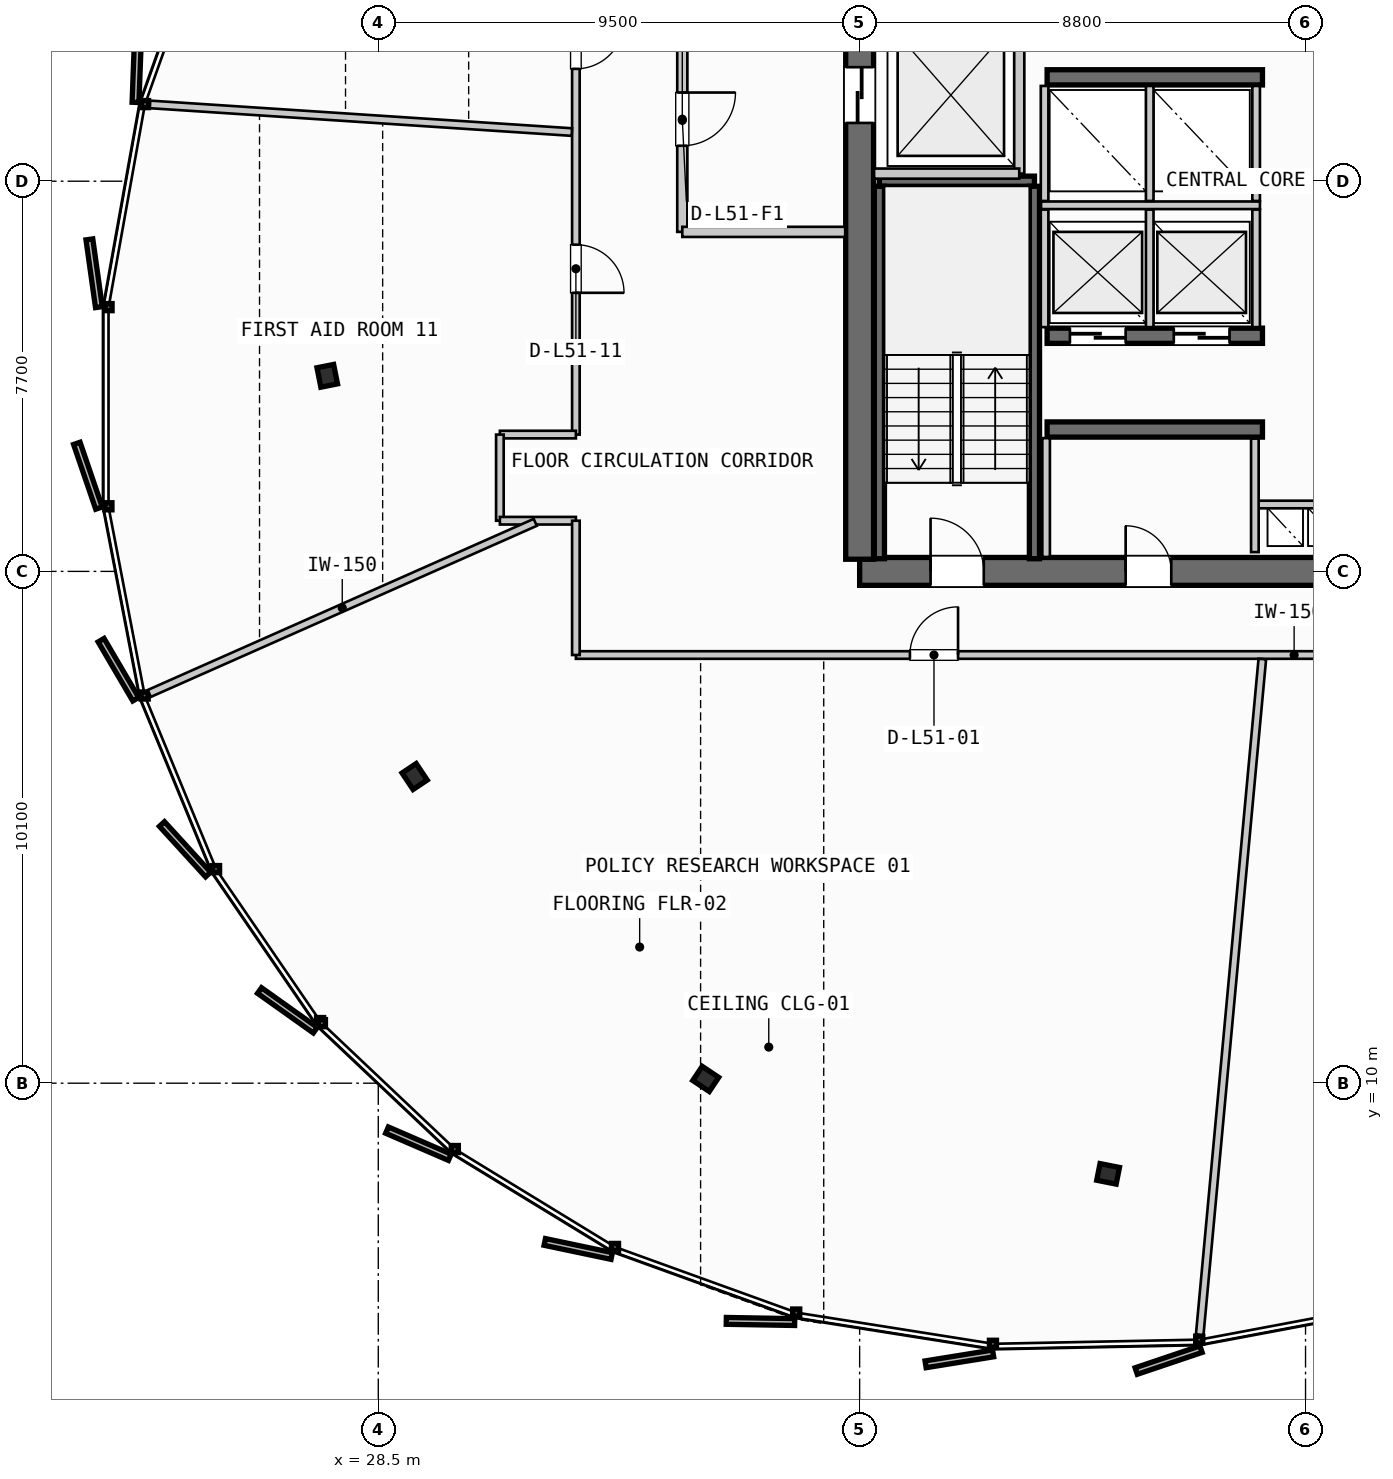
"""IFC4 building model, lengths in metres.
Left out: names, types, materials, properties, quantities, classifications, styles, units other than length and angle.
Written with IfcOpenShell. Run it as: python <this file> out.ifc"""

import sys

from ifc_helpers import new_model, si_unit, direction, frame, frame_2d, origin, origin_2d, place, context, subcontext, project, spatial, rectangle, i_section, extrude, source, transform, mapped, element, fill, save


model = new_model("IFC4")
c1 = context("Model", 3, precision=1e-05, world=origin(), true_north=direction((0.0, 1.0)))
c2 = subcontext(c1, "Body", "Model", "MODEL_VIEW")
j1 = project(units=[si_unit("LENGTHUNIT", "METRE"), si_unit("PLANEANGLEUNIT", "RADIAN")], contexts=[c1])
p1 = place(None, origin())
s1 = spatial("IfcSite", under=j1, at=p1, CompositionType="ELEMENT")
p2 = place(p1, origin())
s2 = spatial("IfcBuilding", under=s1, at=p2, CompositionType="ELEMENT")
p3 = place(p2, frame((0.0, 0.0, 197.4)))
s3 = spatial("IfcBuildingStorey", under=s2, at=p3, CompositionType="ELEMENT", Elevation=197.4)
p4 = place(p3, frame((38.0, 20.1, 0.0), z_axis=(0.0, 0.0, 1.0), x_axis=(1.0, 0.0, 0.0)))
e1 = element("IfcWall", 1, at=p4, inside=s3, PredefinedType="SHEAR", context=c2, shape_type="SweptSolid", body=[
    extrude(rectangle(XDim=17.6, YDim=0.55, at=frame_2d((8.8, 0.0))), origin(), (0.0, 0.0, 1.0), 3.26),
])
p5 = place(p4, frame((1.4, 0.0, 0.0)))
e2 = element("IfcOpeningElement", 2, at=p5, cuts=e1, PredefinedType="OPENING", context=c2, shape_type="SweptSolid", body=[
    extrude(rectangle(XDim=1.05, YDim=2.15, at=frame_2d((0.525, 1.075))), frame((0.0, 0.285, 0.0), z_axis=(0.0, -1.0, 0.0), x_axis=(1.0, 0.0, 0.0)), (0.0, 0.0, 1.0), 0.57),
])
p6 = place(p4, frame((15.15, 0.0, 0.0)))
e3 = element("IfcOpeningElement", 3, at=p6, cuts=e1, PredefinedType="OPENING", context=c2, shape_type="SweptSolid", body=[
    extrude(rectangle(XDim=1.05, YDim=2.15, at=frame_2d((0.525, 1.075))), frame((0.0, 0.285, 0.0), z_axis=(0.0, -1.0, 0.0), x_axis=(1.0, 0.0, 0.0)), (0.0, 0.0, 1.0), 0.57),
])
p7 = place(p4, frame((5.25, 0.0, 0.0)))
e4 = element("IfcOpeningElement", 4, at=p7, cuts=e1, PredefinedType="OPENING", context=c2, shape_type="SweptSolid", body=[
    extrude(rectangle(XDim=0.9, YDim=2.15, at=frame_2d((0.45, 1.075))), frame((0.0, 0.285, 0.0), z_axis=(0.0, -1.0, 0.0), x_axis=(1.0, 0.0, 0.0)), (0.0, 0.0, 1.0), 0.57),
])
p8 = place(p4, frame((11.4, 0.0, 0.0)))
e5 = element("IfcOpeningElement", 5, at=p8, cuts=e1, PredefinedType="OPENING", context=c2, shape_type="SweptSolid", body=[
    extrude(rectangle(XDim=0.95, YDim=2.15, at=frame_2d((0.475, 1.075))), frame((0.0, 0.285, 0.0), z_axis=(0.0, -1.0, 0.0), x_axis=(1.0, 0.0, 0.0)), (0.0, 0.0, 1.0), 0.57),
])
p9 = place(p3, frame((38.0, 35.26, 0.0), z_axis=(0.0, 0.0, 1.0), x_axis=(0.0, -1.0, 0.0)))
e6 = element("IfcWall", 6, at=p9, inside=s3, PredefinedType="SHEAR", context=c2, shape_type="SweptSolid", body=[
    extrude(rectangle(XDim=14.92, YDim=0.55, at=frame_2d((7.46, 0.0))), origin(), (0.0, 0.0, 1.0), 3.26),
])
p10 = place(p9, frame((5.21, 0.0, 0.0)))
e7 = element("IfcOpeningElement", 7, at=p10, cuts=e6, PredefinedType="OPENING", context=c2, shape_type="SweptSolid", body=[
    extrude(rectangle(XDim=1.1, YDim=2.2, at=frame_2d((0.55, 1.1))), frame((0.0, 0.285, 0.0), z_axis=(0.0, -1.0, 0.0), x_axis=(1.0, 0.0, 0.0)), (0.0, 0.0, 1.0), 0.57),
])
p11 = place(p3, frame((41.7, 22.9, 0.0), z_axis=(0.0, 0.0, 1.0), x_axis=(1.0, 0.0, 0.0)))
e8 = element("IfcWall", 8, at=p11, inside=s3, PredefinedType="SHEAR", context=c2, shape_type="SweptSolid", body=[
    extrude(rectangle(XDim=4.25, YDim=0.3, at=frame_2d((2.125, 0.0))), origin(), (0.0, 0.0, 1.0), 3.26),
])
p12 = place(p3, frame((41.7, 24.75, 0.0), z_axis=(0.0, 0.0, 1.0), x_axis=(1.0, 0.0, 0.0)))
e9 = element("IfcWall", 9, at=p12, inside=s3, PredefinedType="SHEAR", context=c2, shape_type="SweptSolid", body=[
    extrude(rectangle(XDim=4.25, YDim=0.3, at=frame_2d((2.125, 0.0))), origin(), (0.0, 0.0, 1.0), 3.26),
])
p13 = place(p12, frame((0.45, 0.0, 0.0)))
e10 = element("IfcOpeningElement", 10, at=p13, cuts=e9, PredefinedType="OPENING", context=c2, shape_type="SweptSolid", body=[
    extrude(rectangle(XDim=1.1, YDim=2.2, at=frame_2d((0.55, 1.1))), frame((0.0, 0.16, 0.0), z_axis=(0.0, -1.0, 0.0), x_axis=(1.0, 0.0, 0.0)), (0.0, 0.0, 1.0), 0.32),
])
p14 = place(p12, frame((2.5, 0.0, 0.0)))
e11 = element("IfcOpeningElement", 11, at=p14, cuts=e9, PredefinedType="OPENING", context=c2, shape_type="SweptSolid", body=[
    extrude(rectangle(XDim=1.1, YDim=2.2, at=frame_2d((0.55, 1.1))), frame((0.0, 0.16, 0.0), z_axis=(0.0, -1.0, 0.0), x_axis=(1.0, 0.0, 0.0)), (0.0, 0.0, 1.0), 0.32),
])
p15 = place(p3, frame((41.7, 29.85, 0.0), z_axis=(0.0, 0.0, 1.0), x_axis=(1.0, 0.0, 0.0)))
e12 = element("IfcWall", 12, at=p15, inside=s3, PredefinedType="SHEAR", context=c2, shape_type="SweptSolid", body=[
    extrude(rectangle(XDim=4.25, YDim=0.3, at=frame_2d((2.125, 0.0))), origin(), (0.0, 0.0, 1.0), 3.26),
])
m1 = source(origin(), c2, "Body", "SweptSolid", [
    extrude(i_section(OverallWidth=0.391, OverallDepth=0.335, WebThickness=0.023, FlangeThickness=0.034, FilletRadius=0.015, at=origin_2d()), origin(), (0.0, 0.0, 1.0), 3.26),
])
for number, where, z_axis, x_axis in (
    (13, (27.493, 23.96, 0.0), (0.0, 0.0, 1.0), (-0.981, -0.195, 0.0)),
    (14, (29.218, 16.052, 0.0), (0.0, 0.0, 1.0), (-0.831, -0.556, 0.0)),
    (15, (34.963, 10.084, 0.0), (0.0, 0.0, 1.0), (-0.556, -0.831, 0.0)),
    (16, (42.904, 8.211, 0.0), (0.0, 0.0, 1.0), (-0.195, -0.981, 0.0)),
):
    element("IfcColumn", number, at=place(p3, frame(where, z_axis=z_axis, x_axis=x_axis)), inside=s3, PredefinedType="COLUMN", context=c2, shape_type="MappedRepresentation", body=[
        mapped(m1, transform((0.0, 0.0, 0.0), scale=1.0)),
    ])
p16 = place(p3, frame((38.39, 27.8, 0.0), z_axis=(0.0, 0.0, 1.0), x_axis=(1.0, 0.0, 0.0)))
e17 = element("IfcWall", 17, at=p16, inside=s3, PredefinedType="SHEAR", context=c2, shape_type="SweptSolid", body=[
    extrude(rectangle(XDim=3.06, YDim=0.2, at=frame_2d((1.53, 0.0))), origin(), (0.0, 0.0, 1.0), 3.26),
])
for number, where, z_axis, x_axis in (
    (18, (41.45, 27.7, 0.0), (0.0, 0.0, 1.0), (0.0, -1.0, 0.0)),
    (19, (38.39, 20.35, 0.0), (0.0, 0.0, 1.0), (0.0, 1.0, 0.0)),
):
    element("IfcWall", number, at=place(p3, frame(where, z_axis=z_axis, x_axis=x_axis)), inside=s3, PredefinedType="SHEAR", context=c2, shape_type="SweptSolid", body=[
        extrude(rectangle(XDim=7.35, YDim=0.2, at=frame_2d((3.675, 0.0))), origin(), (0.0, 0.0, 1.0), 3.26),
    ])
p17 = place(p3, frame((45.8, 21.42, 0.0), z_axis=(0.0, 0.0, 1.0), x_axis=(1.0, 0.0, 0.0)))
e20 = element("IfcWall", 20, at=p17, inside=s3, PredefinedType="PARTITIONING", context=c2, shape_type="SweptSolid", body=[
    extrude(rectangle(XDim=2.0, YDim=0.15, at=frame_2d((1.0, 0.0))), origin(), (0.0, 0.0, 1.0), 2.595),
])
p18 = place(p3, frame((45.8, 20.48, 0.0), z_axis=(0.0, 0.0, 1.0), x_axis=(0.0, 1.0, 0.0)))
e21 = element("IfcWall", 21, at=p18, inside=s3, PredefinedType="PARTITIONING", context=c2, shape_type="SweptSolid", body=[
    extrude(rectangle(XDim=2.24, YDim=0.15, at=frame_2d((1.12, 0.0))), origin(), (0.0, 0.0, 1.0), 2.595),
])
p19 = place(p3, frame((41.15, 27.95, 0.0), z_axis=(0.0, 0.0, 1.0), x_axis=(0.0, 1.0, 0.0)))
e22 = element("IfcWall", 22, at=p19, inside=s3, PredefinedType="PARTITIONING", context=c2, shape_type="SweptSolid", body=[
    extrude(rectangle(XDim=3.1, YDim=0.2, at=frame_2d((1.55, 0.0))), origin(), (0.0, 0.0, 1.0), 2.595),
])
p20 = place(p3, frame((38.285, 27.95, 0.0), z_axis=(0.0, 0.0, 1.0), x_axis=(1.0, 0.0, 0.0)))
e23 = element("IfcWall", 23, at=p20, inside=s3, PredefinedType="PARTITIONING", context=c2, shape_type="SweptSolid", body=[
    extrude(rectangle(XDim=2.865, YDim=0.2, at=frame_2d((1.433, 0.0))), origin(), (0.0, 0.0, 1.0), 2.595),
])
p21 = place(p3, frame((34.5, 31.2, 0.0), z_axis=(0.0, 0.0, 1.0), x_axis=(0.0, -1.0, 0.0)))
e24 = element("IfcWall", 24, at=p21, inside=s3, PredefinedType="PARTITIONING", context=c2, shape_type="SweptSolid", body=[
    extrude(rectangle(XDim=4.4, YDim=0.2, at=frame_2d((2.2, 0.0))), origin(), (0.0, 0.0, 1.0), 2.595),
])
p22 = place(p21, frame((1.65, 0.0, 0.0)))
e25 = element("IfcOpeningElement", 25, at=p22, cuts=e24, PredefinedType="OPENING", context=c2, shape_type="SweptSolid", body=[
    extrude(rectangle(XDim=1.05, YDim=2.15, at=frame_2d((0.525, 1.075))), frame((0.0, 0.11, 0.0), z_axis=(0.0, -1.0, 0.0), x_axis=(1.0, 0.0, 0.0)), (0.0, 0.0, 1.0), 0.22),
])
p23 = place(p3, frame((34.5, 26.8, 0.0), z_axis=(0.0, 0.0, 1.0), x_axis=(1.0, 0.0, 0.0)))
e26 = element("IfcWall", 26, at=p23, inside=s3, PredefinedType="PARTITIONING", context=c2, shape_type="SweptSolid", body=[
    extrude(rectangle(XDim=3.215, YDim=0.2, at=frame_2d((1.607, 0.0))), origin(), (0.0, 0.0, 1.0), 2.595),
])
p24 = place(p3, frame((41.68, 20.385, 0.0), z_axis=(0.0, 0.0, 1.0), x_axis=(0.0, 1.0, 0.0)))
e27 = element("IfcWall", 27, at=p24, inside=s3, PredefinedType="PARTITIONING", context=c2, shape_type="SweptSolid", body=[
    extrude(rectangle(XDim=2.345, YDim=0.15, at=frame_2d((1.172, 0.0))), origin(), (0.0, 0.0, 1.0), 2.595),
])
p25 = place(p3, frame((41.58, 27.325, 0.0), z_axis=(0.0, 0.0, 1.0), x_axis=(1.0, 0.0, 0.0)))
e28 = element("IfcWall", 28, at=p25, inside=s3, PredefinedType="PARTITIONING", context=c2, shape_type="SweptSolid", body=[
    extrude(rectangle(XDim=4.32, YDim=0.15, at=frame_2d((2.16, 0.0))), origin(), (0.0, 0.0, 1.0), 2.595),
])
for number, where, z_axis, x_axis in (
    (29, (41.65, 24.92, 0.0), (0.0, 0.0, 1.0), (0.0, 1.0, 0.0)),
    (30, (43.725, 24.92, 0.0), (0.0, 0.0, 1.0), (0.0, 1.0, 0.0)),
    (31, (45.825, 24.92, 0.0), (0.0, 0.0, 1.0), (0.0, 1.0, 0.0)),
):
    element("IfcWall", number, at=place(p3, frame(where, z_axis=z_axis, x_axis=x_axis)), inside=s3, PredefinedType="PARTITIONING", context=c2, shape_type="SweptSolid", body=[
        extrude(rectangle(XDim=2.32, YDim=0.15, at=frame_2d((1.16, 0.0))), origin(), (0.0, 0.0, 1.0), 2.595),
    ])
for number, where, z_axis, x_axis in (
    (32, (41.65, 27.41, 0.0), (0.0, 0.0, 1.0), (0.0, 1.0, 0.0)),
    (33, (43.725, 27.41, 0.0), (0.0, 0.0, 1.0), (0.0, 1.0, 0.0)),
    (34, (45.825, 27.41, 0.0), (0.0, 0.0, 1.0), (0.0, 1.0, 0.0)),
):
    element("IfcWall", number, at=place(p3, frame(where, z_axis=z_axis, x_axis=x_axis)), inside=s3, PredefinedType="PARTITIONING", context=c2, shape_type="SweptSolid", body=[
        extrude(rectangle(XDim=2.27, YDim=0.15, at=frame_2d((1.135, 0.0))), origin(), (0.0, 0.0, 1.0), 2.595),
    ])
p26 = place(p3, frame((32.4, 18.45, 0.0), z_axis=(0.0, 0.0, 1.0), x_axis=(1.0, 0.0, 0.0)))
e35 = element("IfcWall", 35, at=p26, inside=s3, PredefinedType="PARTITIONING", context=c2, shape_type="SweptSolid", body=[
    extrude(rectangle(XDim=28.35, YDim=0.15, at=frame_2d((14.175, 0.0))), origin(), (0.0, 0.0, 1.0), 2.595),
])
p27 = place(p26, frame((6.592, 0.0, 0.0)))
e36 = element("IfcOpeningElement", 36, at=p27, cuts=e35, PredefinedType="OPENING", context=c2, shape_type="SweptSolid", body=[
    extrude(rectangle(XDim=0.95, YDim=2.15, at=frame_2d((0.475, 1.075))), frame((0.0, 0.085, 0.0), z_axis=(0.0, -1.0, 0.0), x_axis=(1.0, 0.0, 0.0)), (0.0, 0.0, 1.0), 0.17),
])
p28 = place(p26, frame((19.725, 0.0, 0.0)))
e37 = element("IfcOpeningElement", 37, at=p28, cuts=e35, PredefinedType="OPENING", context=c2, shape_type="SweptSolid", body=[
    extrude(rectangle(XDim=0.95, YDim=2.15, at=frame_2d((0.475, 1.075))), frame((0.0, 0.085, 0.0), z_axis=(0.0, -1.0, 0.0), x_axis=(1.0, 0.0, 0.0)), (0.0, 0.0, 1.0), 0.17),
])
p29 = place(p3, frame((32.4, 32.8, 0.0), z_axis=(0.0, 0.0, 1.0), x_axis=(0.0, -1.0, 0.0)))
e38 = element("IfcWall", 38, at=p29, inside=s3, PredefinedType="PARTITIONING", context=c2, shape_type="SweptSolid", body=[
    extrude(rectangle(XDim=10.0, YDim=0.15, at=frame_2d((5.0, 0.0))), origin(), (0.0, 0.0, 1.0), 2.595),
])
p30 = place(p29, frame((1.833, 0.0, 0.0)))
e39 = element("IfcOpeningElement", 39, at=p30, cuts=e38, PredefinedType="OPENING", context=c2, shape_type="SweptSolid", body=[
    extrude(rectangle(XDim=0.95, YDim=2.15, at=frame_2d((0.475, 1.075))), frame((0.0, 0.085, 0.0), z_axis=(0.0, -1.0, 0.0), x_axis=(1.0, 0.0, 0.0)), (0.0, 0.0, 1.0), 0.17),
])
p31 = place(p29, frame((6.252, 0.0, 0.0)))
e40 = element("IfcOpeningElement", 40, at=p31, cuts=e38, PredefinedType="OPENING", context=c2, shape_type="SweptSolid", body=[
    extrude(rectangle(XDim=0.95, YDim=2.15, at=frame_2d((0.475, 1.075))), frame((0.0, 0.085, 0.0), z_axis=(0.0, -1.0, 0.0), x_axis=(1.0, 0.0, 0.0)), (0.0, 0.0, 1.0), 0.17),
])
p32 = place(p3, frame((32.4, 22.8, 0.0), z_axis=(0.0, 0.0, 1.0), x_axis=(-1.0, 0.0, 0.0)))
e41 = element("IfcWall", 41, at=p32, inside=s3, PredefinedType="PARTITIONING", context=c2, shape_type="SweptSolid", body=[
    extrude(rectangle(XDim=1.5, YDim=0.15, at=frame_2d((0.75, 0.0))), origin(), (0.0, 0.0, 1.0), 2.595),
])
p33 = place(p3, frame((30.9, 22.8, 0.0), z_axis=(0.0, 0.0, 1.0), x_axis=(0.0, -1.0, 0.0)))
e42 = element("IfcWall", 42, at=p33, inside=s3, PredefinedType="PARTITIONING", context=c2, shape_type="SweptSolid", body=[
    extrude(rectangle(XDim=1.7, YDim=0.15, at=frame_2d((0.85, 0.0))), origin(), (0.0, 0.0, 1.0), 2.595),
])
p34 = place(p3, frame((30.9, 21.1, 0.0), z_axis=(0.0, 0.0, 1.0), x_axis=(1.0, 0.0, 0.0)))
e43 = element("IfcWall", 43, at=p34, inside=s3, PredefinedType="PARTITIONING", context=c2, shape_type="SweptSolid", body=[
    extrude(rectangle(XDim=1.5, YDim=0.15, at=frame_2d((0.75, 0.0))), origin(), (0.0, 0.0, 1.0), 2.595),
])
p35 = place(p3, frame((32.4, 21.1, 0.0), z_axis=(0.0, 0.0, 1.0), x_axis=(0.0, -1.0, 0.0)))
e44 = element("IfcWall", 44, at=p35, inside=s3, PredefinedType="PARTITIONING", context=c2, shape_type="SweptSolid", body=[
    extrude(rectangle(XDim=2.65, YDim=0.15, at=frame_2d((1.325, 0.0))), origin(), (0.0, 0.0, 1.0), 2.595),
])
p36 = place(p3, frame((31.598, 21.068, 0.0), z_axis=(0.0, 0.0, 1.0), x_axis=(-0.91421466332, -0.405230242419, 0.0)))
e45 = element("IfcWall", 45, at=p36, inside=s3, PredefinedType="PARTITIONING", context=c2, shape_type="SweptSolid", body=[
    extrude(rectangle(XDim=8.332, YDim=0.15, at=frame_2d((4.166, 0.0))), origin(), (0.0, 0.0, 1.0), 2.595),
])
p37 = place(p3, frame((45.947, 18.37, 0.0), z_axis=(0.0, 0.0, 1.0), x_axis=(-0.092260145088, -0.995734937435, 0.0)))
e46 = element("IfcWall", 46, at=p37, inside=s3, PredefinedType="PARTITIONING", context=c2, shape_type="SweptSolid", body=[
    extrude(rectangle(XDim=13.39, YDim=0.15, at=frame_2d((6.695, 0.0))), origin(), (0.0, 0.0, 1.0), 2.595),
])
p38 = place(p3, frame((32.32, 28.77, 0.0), z_axis=(0.0, 0.0, 1.0), x_axis=(-0.997858734146, 0.06540601416, 0.0)))
e47 = element("IfcWall", 47, at=p38, inside=s3, PredefinedType="PARTITIONING", context=c2, shape_type="SweptSolid", body=[
    extrude(rectangle(XDim=8.343, YDim=0.15, at=frame_2d((4.171, 0.0))), origin(), (0.0, 0.0, 1.0), 2.595),
])
m2 = source(origin(), c2, "Body", "SweptSolid", [
    extrude(rectangle(XDim=1.05, YDim=2.15, at=frame_2d((0.525, 1.075))), frame((0.0, 0.025, 0.0), z_axis=(0.0, -1.0, 0.0), x_axis=(1.0, 0.0, 0.0)), (0.0, 0.0, 1.0), 0.05),
])
p39 = place(p5, origin())
e48 = element("IfcDoor", 48, at=p39, inside=s3, OperationType="SINGLE_SWING_LEFT", PredefinedType="DOOR", context=c2, shape_type="MappedRepresentation", body=[
    mapped(m2, transform((0.0, 0.0, 0.0), scale=1.0)),
])
fill(e2, e48)
m3 = source(origin(), c2, "Body", "SweptSolid", [
    extrude(rectangle(XDim=1.1, YDim=2.2, at=frame_2d((0.55, 1.1))), frame((0.0, 0.025, 0.0), z_axis=(0.0, -1.0, 0.0), x_axis=(1.0, 0.0, 0.0)), (0.0, 0.0, 1.0), 0.05),
])
p40 = place(p10, origin())
e49 = element("IfcDoor", 49, at=p40, inside=s3, OperationType="SLIDING_TO_LEFT", PredefinedType="DOOR", context=c2, shape_type="MappedRepresentation", body=[
    mapped(m3, transform((0.0, 0.0, 0.0), scale=1.0)),
])
fill(e7, e49)
m4 = source(origin(), c2, "Body", "SweptSolid", [
    extrude(rectangle(XDim=0.9, YDim=2.15, at=frame_2d((0.45, 1.075))), frame((0.0, 0.025, 0.0), z_axis=(0.0, -1.0, 0.0), x_axis=(1.0, 0.0, 0.0)), (0.0, 0.0, 1.0), 0.05),
])
p41 = place(p7, origin())
e50 = element("IfcDoor", 50, at=p41, inside=s3, OperationType="SINGLE_SWING_LEFT", PredefinedType="DOOR", context=c2, shape_type="MappedRepresentation", body=[
    mapped(m4, transform((0.0, 0.0, 0.0), scale=1.0)),
])
fill(e4, e50)
p42 = place(p13, origin())
e51 = element("IfcDoor", 51, at=p42, inside=s3, OperationType="SLIDING_TO_RIGHT", PredefinedType="DOOR", context=c2, shape_type="MappedRepresentation", body=[
    mapped(m3, transform((0.0, 0.0, 0.0), scale=1.0)),
])
fill(e10, e51)
p43 = place(p14, origin())
e52 = element("IfcDoor", 52, at=p43, inside=s3, OperationType="SLIDING_TO_RIGHT", PredefinedType="DOOR", context=c2, shape_type="MappedRepresentation", body=[
    mapped(m3, transform((0.0, 0.0, 0.0), scale=1.0)),
])
fill(e11, e52)
p44 = place(p22, origin())
e53 = element("IfcDoor", 53, at=p44, inside=s3, OperationType="SINGLE_SWING_LEFT", PredefinedType="DOOR", context=c2, shape_type="MappedRepresentation", body=[
    mapped(m2, transform((0.0, 0.0, 0.0), scale=1.0)),
])
fill(e25, e53)
m5 = source(origin(), c2, "Body", "SweptSolid", [
    extrude(rectangle(XDim=0.95, YDim=2.15, at=frame_2d((0.475, 1.075))), frame((0.0, 0.025, 0.0), z_axis=(0.0, -1.0, 0.0), x_axis=(1.0, 0.0, 0.0)), (0.0, 0.0, 1.0), 0.05),
])
p45 = place(p27, origin())
e54 = element("IfcDoor", 54, at=p45, inside=s3, OperationType="SINGLE_SWING_RIGHT", PredefinedType="DOOR", context=c2, shape_type="MappedRepresentation", body=[
    mapped(m5, transform((0.0, 0.0, 0.0), scale=1.0)),
])
fill(e36, e54)
p46 = place(p30, origin())
e55 = element("IfcDoor", 55, at=p46, inside=s3, OperationType="SINGLE_SWING_LEFT", PredefinedType="DOOR", context=c2, shape_type="MappedRepresentation", body=[
    mapped(m5, transform((0.0, 0.0, 0.0), scale=1.0)),
])
fill(e39, e55)
p47 = place(p31, origin())
e56 = element("IfcDoor", 56, at=p47, inside=s3, OperationType="SINGLE_SWING_RIGHT", PredefinedType="DOOR", context=c2, shape_type="MappedRepresentation", body=[
    mapped(m5, transform((0.0, 0.0, 0.0), scale=1.0)),
])
fill(e40, e56)
save(model, sys.argv[1])
